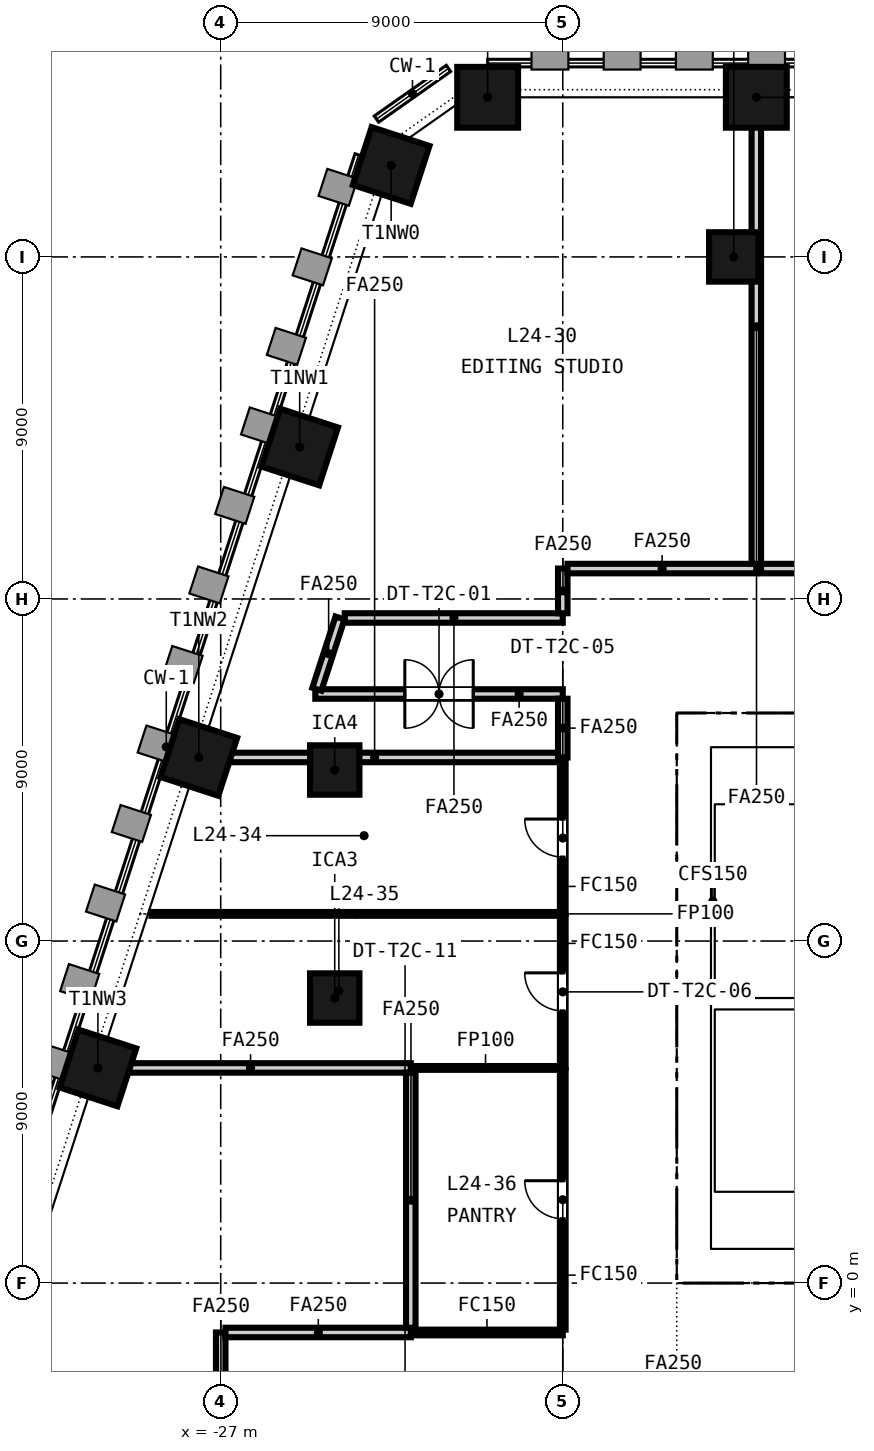
"""IFC4 building model, lengths in metres.
Left out: names, types, materials, properties, quantities, classifications, styles, units other than length and angle.
Written with IfcOpenShell. Run it as: python <this file> out.ifc"""

import sys

from ifc_helpers import new_model, si_unit, direction, frame, frame_2d, origin, origin_2d, place, context, subcontext, project, spatial, rectangle, extrude, element, fill, save


model = new_model("IFC4")
c1 = context("Model", 3, precision=1e-05, world=origin(), true_north=direction((0.0, 1.0)))
c2 = subcontext(c1, "Body", "Model", "MODEL_VIEW")
j1 = project(units=[si_unit("LENGTHUNIT", "METRE"), si_unit("PLANEANGLEUNIT", "RADIAN")], contexts=[c1])
p1 = place(None, origin())
s1 = spatial("IfcSite", under=j1, at=p1, CompositionType="ELEMENT")
p2 = place(p1, origin())
s2 = spatial("IfcBuilding", under=s1, at=p2, CompositionType="ELEMENT")
p3 = place(p2, frame((0.0, 0.0, 102.55)))
s3 = spatial("IfcBuildingStorey", under=s2, at=p3, CompositionType="ELEMENT", Elevation=102.55)
p4 = place(p3, frame((-15.0, 0.45, -0.15), z_axis=(0.0, 0.0, 1.0), x_axis=(1.0, 0.0, 0.0)))
e1 = element("IfcWall", 1, at=p4, inside=s3, PredefinedType="SOLIDWALL", context=c2, shape_type="SweptSolid", body=[
    extrude(rectangle(XDim=30.0, YDim=0.9, at=frame_2d((15.0, 0.0))), origin(), (0.0, 0.0, 1.0), 3.65),
])
p5 = place(p4, frame((5.8, 0.0, 0.15)))
e2 = element("IfcOpeningElement", 2, at=p5, cuts=e1, PredefinedType="OPENING", context=c2, shape_type="SweptSolid", body=[
    extrude(rectangle(XDim=2.4, YDim=2.4, at=frame_2d((1.2, 1.2))), frame((0.0, 0.46, 0.0), z_axis=(0.0, -1.0, 0.0), x_axis=(1.0, 0.0, 0.0)), (0.0, 0.0, 1.0), 0.92),
])
p6 = place(p4, frame((13.8, 0.0, 0.15)))
e3 = element("IfcOpeningElement", 3, at=p6, cuts=e1, PredefinedType="OPENING", context=c2, shape_type="SweptSolid", body=[
    extrude(rectangle(XDim=2.4, YDim=2.4, at=frame_2d((1.2, 1.2))), frame((0.0, 0.46, 0.0), z_axis=(0.0, -1.0, 0.0), x_axis=(1.0, 0.0, 0.0)), (0.0, 0.0, 1.0), 0.92),
])
p7 = place(p4, frame((21.8, 0.0, 0.15)))
e4 = element("IfcOpeningElement", 4, at=p7, cuts=e1, PredefinedType="OPENING", context=c2, shape_type="SweptSolid", body=[
    extrude(rectangle(XDim=2.4, YDim=2.4, at=frame_2d((1.2, 1.2))), frame((0.0, 0.46, 0.0), z_axis=(0.0, -1.0, 0.0), x_axis=(1.0, 0.0, 0.0)), (0.0, 0.0, 1.0), 0.92),
])
p8 = place(p4, frame((1.5, 0.0, 0.15)))
e5 = element("IfcOpeningElement", 5, at=p8, cuts=e1, PredefinedType="OPENING", context=c2, shape_type="SweptSolid", body=[
    extrude(rectangle(XDim=1.2, YDim=2.1, at=frame_2d((0.6, 1.05))), frame((0.0, 0.46, 0.0), z_axis=(0.0, -1.0, 0.0), x_axis=(1.0, 0.0, 0.0)), (0.0, 0.0, 1.0), 0.92),
])
p9 = place(p4, frame((27.3, 0.0, 0.15)))
e6 = element("IfcOpeningElement", 6, at=p9, cuts=e1, PredefinedType="OPENING", context=c2, shape_type="SweptSolid", body=[
    extrude(rectangle(XDim=1.2, YDim=2.1, at=frame_2d((0.6, 1.05))), frame((0.0, 0.46, 0.0), z_axis=(0.0, -1.0, 0.0), x_axis=(1.0, 0.0, 0.0)), (0.0, 0.0, 1.0), 0.92),
])
p10 = place(p3, frame((-15.0, 14.55, -0.15), z_axis=(0.0, 0.0, 1.0), x_axis=(1.0, 0.0, 0.0)))
e7 = element("IfcWall", 7, at=p10, inside=s3, PredefinedType="SOLIDWALL", context=c2, shape_type="SweptSolid", body=[
    extrude(rectangle(XDim=30.0, YDim=0.9, at=frame_2d((15.0, 0.0))), origin(), (0.0, 0.0, 1.0), 3.65),
])
p11 = place(p10, frame((9.25, 0.0, 0.15)))
e8 = element("IfcOpeningElement", 8, at=p11, cuts=e7, PredefinedType="OPENING", context=c2, shape_type="SweptSolid", body=[
    extrude(rectangle(XDim=1.5, YDim=2.1, at=frame_2d((0.75, 1.05))), frame((0.0, 0.46, 0.0), z_axis=(0.0, -1.0, 0.0), x_axis=(1.0, 0.0, 0.0)), (0.0, 0.0, 1.0), 0.92),
])
p12 = place(p10, frame((19.4, 0.0, 0.15)))
e9 = element("IfcOpeningElement", 9, at=p12, cuts=e7, PredefinedType="OPENING", context=c2, shape_type="SweptSolid", body=[
    extrude(rectangle(XDim=1.5, YDim=2.1, at=frame_2d((0.75, 1.05))), frame((0.0, 0.46, 0.0), z_axis=(0.0, -1.0, 0.0), x_axis=(1.0, 0.0, 0.0)), (0.0, 0.0, 1.0), 0.92),
])
p13 = place(p10, frame((1.5, 0.0, 0.15)))
e10 = element("IfcOpeningElement", 10, at=p13, cuts=e7, PredefinedType="OPENING", context=c2, shape_type="SweptSolid", body=[
    extrude(rectangle(XDim=1.2, YDim=2.1, at=frame_2d((0.6, 1.05))), frame((0.0, 0.46, 0.0), z_axis=(0.0, -1.0, 0.0), x_axis=(1.0, 0.0, 0.0)), (0.0, 0.0, 1.0), 0.92),
])
p14 = place(p10, frame((27.3, 0.0, 0.15)))
e11 = element("IfcOpeningElement", 11, at=p14, cuts=e7, PredefinedType="OPENING", context=c2, shape_type="SweptSolid", body=[
    extrude(rectangle(XDim=1.2, YDim=2.1, at=frame_2d((0.6, 1.05))), frame((0.0, 0.46, 0.0), z_axis=(0.0, -1.0, 0.0), x_axis=(1.0, 0.0, 0.0)), (0.0, 0.0, 1.0), 0.92),
])
p15 = place(p3, frame((-14.55, 0.9, -0.15), z_axis=(0.0, 0.0, 1.0), x_axis=(0.0, 1.0, 0.0)))
e12 = element("IfcWall", 12, at=p15, inside=s3, PredefinedType="SOLIDWALL", context=c2, shape_type="SweptSolid", body=[
    extrude(rectangle(XDim=13.2, YDim=0.9, at=frame_2d((6.6, 0.0))), origin(), (0.0, 0.0, 1.0), 3.65),
])
for number, where, z_axis, x_axis in (
    (13, (-12.907, 31.2, -0.15), (0.0, 0.0, 1.0), (-1.0, 0.0, 0.0)),
    (14, (-19.976, 31.2, -0.15), (0.0, 0.0, 1.0), (-1.0, 0.0, 0.0)),
    (15, (-22.515, 29.407, -0.15), (0.0, 0.0, 1.0), (-0.309, -0.951, 0.0)),
    (16, (-24.923, 21.999, -0.15), (0.0, 0.0, 1.0), (-0.309, -0.951, 0.0)),
    (17, (-27.577, 13.83, -0.15), (0.0, 0.0, 1.0), (-0.309, -0.951, 0.0)),
    (18, (-30.231, 5.661, -0.15), (0.0, 0.0, 1.0), (-0.309, -0.951, 0.0)),
):
    element("IfcColumn", number, at=place(p3, frame(where, z_axis=z_axis, x_axis=x_axis)), inside=s3, PredefinedType="COLUMN", context=c2, shape_type="SweptSolid", body=[
        extrude(rectangle(XDim=1.6, YDim=1.6, at=origin_2d()), origin(), (0.0, 0.0, 1.0), 3.65),
    ])
for number, where, z_axis, x_axis in (
    (19, (-24.0, 7.5, -0.15), (0.0, 0.0, 1.0), (1.0, 0.0, 0.0)),
    (20, (-24.0, 13.5, -0.15), (0.0, 0.0, 1.0), (1.0, 0.0, 0.0)),
    (21, (-13.5, 27.0, -0.15), (0.0, 0.0, 1.0), (1.0, 0.0, 0.0)),
):
    element("IfcColumn", number, at=place(p3, frame(where, z_axis=z_axis, x_axis=x_axis)), inside=s3, PredefinedType="COLUMN", context=c2, shape_type="SweptSolid", body=[
        extrude(rectangle(XDim=1.3, YDim=1.3, at=origin_2d()), origin(), (0.0, 0.0, 1.0), 3.65),
    ])
p16 = place(p3, frame((-14.0, 7.35, 0.0), z_axis=(0.0, 0.0, 1.0), x_axis=(1.0, 0.0, 0.0)))
e22 = element("IfcWall", 22, at=p16, inside=s3, PredefinedType="SOLIDWALL", context=c2, shape_type="SweptSolid", body=[
    extrude(rectangle(XDim=2.95, YDim=0.3, at=frame_2d((1.475, 0.0))), origin(), (0.0, 0.0, 1.0), 3.5),
])
p17 = place(p3, frame((-14.05, 0.9, 0.0), z_axis=(0.0, 0.0, 1.0), x_axis=(0.0, 1.0, 0.0)))
e23 = element("IfcWall", 23, at=p17, inside=s3, PredefinedType="SOLIDWALL", context=c2, shape_type="SweptSolid", body=[
    extrude(rectangle(XDim=13.2, YDim=0.1, at=frame_2d((6.6, 0.0))), origin(), (0.0, 0.0, 1.0), 3.5),
])
p18 = place(p3, frame((-18.0, 15.5, 0.0), z_axis=(0.0, 0.0, 1.0), x_axis=(-1.0, 0.0, 0.0)))
e24 = element("IfcWall", 24, at=p18, inside=s3, PredefinedType="PARTITIONING", context=c2, shape_type="SweptSolid", body=[
    extrude(rectangle(XDim=6.511, YDim=0.25, at=frame_2d((3.255, 0.0))), origin(), (0.0, 0.0, 1.0), 2.741),
])
p19 = place(p18, frame((2.355, 0.0, 0.0)))
e25 = element("IfcOpeningElement", 25, at=p19, cuts=e24, PredefinedType="OPENING", context=c2, shape_type="SweptSolid", body=[
    extrude(rectangle(XDim=1.8, YDim=2.1, at=frame_2d((0.9, 1.05))), frame((0.0, 0.135, 0.0), z_axis=(0.0, -1.0, 0.0), x_axis=(1.0, 0.0, 0.0)), (0.0, 0.0, 1.0), 0.27),
])
p20 = place(p3, frame((-24.47, 15.625, 0.0), z_axis=(0.0, 0.0, 1.0), x_axis=(0.309086072338, 0.951034068731, 0.0)))
e26 = element("IfcWall", 26, at=p20, inside=s3, PredefinedType="PARTITIONING", context=c2, shape_type="SweptSolid", body=[
    extrude(rectangle(XDim=1.971, YDim=0.25, at=frame_2d((0.986, 0.0))), origin(), (0.0, 0.0, 1.0), 2.741),
])
p21 = place(p3, frame((-23.736, 17.5, 0.0), z_axis=(0.0, 0.0, 1.0), x_axis=(1.0, 0.0, 0.0)))
e27 = element("IfcWall", 27, at=p21, inside=s3, PredefinedType="PARTITIONING", context=c2, shape_type="SweptSolid", body=[
    extrude(rectangle(XDim=5.736, YDim=0.25, at=frame_2d((2.868, 0.0))), origin(), (0.0, 0.0, 1.0), 2.741),
])
p22 = place(p3, frame((-18.0, 17.625, 0.0), z_axis=(0.0, 0.0, 1.0), x_axis=(0.0, 1.0, 0.0)))
e28 = element("IfcWall", 28, at=p22, inside=s3, PredefinedType="PARTITIONING", context=c2, shape_type="SweptSolid", body=[
    extrude(rectangle(XDim=1.175, YDim=0.25, at=frame_2d((0.587, 0.0))), origin(), (0.0, 0.0, 1.0), 2.741),
])
p23 = place(p3, frame((-17.875, 18.8, 0.0), z_axis=(0.0, 0.0, 1.0), x_axis=(1.0, 0.0, 0.0)))
e29 = element("IfcWall", 29, at=p23, inside=s3, PredefinedType="PARTITIONING", context=c2, shape_type="SweptSolid", body=[
    extrude(rectangle(XDim=4.968, YDim=0.25, at=frame_2d((2.484, 0.0))), origin(), (0.0, 0.0, 1.0), 2.741),
])
p24 = place(p3, frame((-18.0, 13.83, 0.0), z_axis=(0.0, 0.0, 1.0), x_axis=(0.0, 1.0, 0.0)))
e30 = element("IfcWall", 30, at=p24, inside=s3, PredefinedType="PARTITIONING", context=c2, shape_type="SweptSolid", body=[
    extrude(rectangle(XDim=1.545, YDim=0.25, at=frame_2d((0.772, 0.0))), origin(), (0.0, 0.0, 1.0), 2.741),
])
p25 = place(p3, frame((-12.907, 18.925, 0.0), z_axis=(0.0, 0.0, 1.0), x_axis=(0.0, 1.0, 0.0)))
e31 = element("IfcWall", 31, at=p25, inside=s3, PredefinedType="PARTITIONING", context=c2, shape_type="SweptSolid", body=[
    extrude(rectangle(XDim=12.475, YDim=0.25, at=frame_2d((6.237, 0.0))), origin(), (0.0, 0.0, 1.0), 2.741),
])
p26 = place(p3, frame((-27.787, 13.83, 0.0), z_axis=(0.0, 0.0, 1.0), x_axis=(1.0, 0.0, 0.0)))
e32 = element("IfcWall", 32, at=p26, inside=s3, PredefinedType="PARTITIONING", context=c2, shape_type="SweptSolid", body=[
    extrude(rectangle(XDim=9.662, YDim=0.25, at=frame_2d((4.831, 0.0))), origin(), (0.0, 0.0, 1.0), 2.741),
])
p27 = place(p3, frame((-12.782, 18.8, 0.0), z_axis=(0.0, 0.0, 1.0), x_axis=(1.0, 0.0, 0.0)))
e33 = element("IfcWall", 33, at=p27, inside=s3, PredefinedType="PARTITIONING", context=c2, shape_type="SweptSolid", body=[
    extrude(rectangle(XDim=5.882, YDim=0.25, at=frame_2d((2.941, 0.0))), origin(), (0.0, 0.0, 1.0), 2.741),
])
p28 = place(p3, frame((-18.0, 9.714, 0.0), z_axis=(0.0, 0.0, 1.0), x_axis=(0.0, 1.0, 0.0)))
e34 = element("IfcWall", 34, at=p28, inside=s3, PredefinedType="PARTITIONING", context=c2, shape_type="SweptSolid", body=[
    extrude(rectangle(XDim=3.991, YDim=0.15, at=frame_2d((1.996, 0.0))), origin(), (0.0, 0.0, 1.0), 2.741),
])
p29 = place(p28, frame((1.496, 0.0, 0.0)))
e35 = element("IfcOpeningElement", 35, at=p29, cuts=e34, PredefinedType="OPENING", context=c2, shape_type="SweptSolid", body=[
    extrude(rectangle(XDim=1.0, YDim=2.1, at=frame_2d((0.5, 1.05))), frame((0.0, 0.085, 0.0), z_axis=(0.0, -1.0, 0.0), x_axis=(1.0, 0.0, 0.0)), (0.0, 0.0, 1.0), 0.17),
])
p30 = place(p3, frame((-28.824, 9.714, 0.0), z_axis=(0.0, 0.0, 1.0), x_axis=(1.0, 0.0, 0.0)))
e36 = element("IfcWall", 36, at=p30, inside=s3, PredefinedType="PARTITIONING", context=c2, shape_type="SweptSolid", body=[
    extrude(rectangle(XDim=10.749, YDim=0.1, at=frame_2d((5.375, 0.0))), origin(), (0.0, 0.0, 1.0), 2.741),
])
p31 = place(p3, frame((-18.0, 5.661, 0.0), z_axis=(0.0, 0.0, 1.0), x_axis=(0.0, 1.0, 0.0)))
e37 = element("IfcWall", 37, at=p31, inside=s3, PredefinedType="PARTITIONING", context=c2, shape_type="SweptSolid", body=[
    extrude(rectangle(XDim=4.003, YDim=0.15, at=frame_2d((2.001, 0.0))), origin(), (0.0, 0.0, 1.0), 2.741),
])
p32 = place(p31, frame((1.501, 0.0, 0.0)))
e38 = element("IfcOpeningElement", 38, at=p32, cuts=e37, PredefinedType="OPENING", context=c2, shape_type="SweptSolid", body=[
    extrude(rectangle(XDim=1.0, YDim=2.1, at=frame_2d((0.5, 1.05))), frame((0.0, 0.085, 0.0), z_axis=(0.0, -1.0, 0.0), x_axis=(1.0, 0.0, 0.0)), (0.0, 0.0, 1.0), 0.17),
])
p33 = place(p3, frame((-21.999, 5.661, 0.0), z_axis=(0.0, 0.0, 1.0), x_axis=(1.0, 0.0, 0.0)))
e39 = element("IfcWall", 39, at=p33, inside=s3, PredefinedType="PARTITIONING", context=c2, shape_type="SweptSolid", body=[
    extrude(rectangle(XDim=3.924, YDim=0.1, at=frame_2d((1.962, 0.0))), origin(), (0.0, 0.0, 1.0), 2.741),
])
p34 = place(p3, frame((-30.441, 5.661, 0.0), z_axis=(0.0, 0.0, 1.0), x_axis=(1.0, 0.0, 0.0)))
e40 = element("IfcWall", 40, at=p34, inside=s3, PredefinedType="PARTITIONING", context=c2, shape_type="SweptSolid", body=[
    extrude(rectangle(XDim=8.442, YDim=0.25, at=frame_2d((4.221, 0.0))), origin(), (0.0, 0.0, 1.0), 2.741),
])
p35 = place(p3, frame((-21.999, -1.3, 0.0), z_axis=(0.0, 0.0, 1.0), x_axis=(1.0, 0.0, 0.0)))
e41 = element("IfcWall", 41, at=p35, inside=s3, PredefinedType="PARTITIONING", context=c2, shape_type="SweptSolid", body=[
    extrude(rectangle(XDim=3.999, YDim=0.15, at=frame_2d((2.0, 0.0))), origin(), (0.0, 0.0, 1.0), 2.741),
])
p36 = place(p3, frame((-18.0, -1.225, 0.0), z_axis=(0.0, 0.0, 1.0), x_axis=(0.0, 1.0, 0.0)))
e42 = element("IfcWall", 42, at=p36, inside=s3, PredefinedType="PARTITIONING", context=c2, shape_type="SweptSolid", body=[
    extrude(rectangle(XDim=6.836, YDim=0.15, at=frame_2d((3.418, 0.0))), origin(), (0.0, 0.0, 1.0), 2.741),
])
p37 = place(p36, frame((2.918, 0.0, 0.0)))
e43 = element("IfcOpeningElement", 43, at=p37, cuts=e42, PredefinedType="OPENING", context=c2, shape_type="SweptSolid", body=[
    extrude(rectangle(XDim=1.0, YDim=2.1, at=frame_2d((0.5, 1.05))), frame((0.0, 0.085, 0.0), z_axis=(0.0, -1.0, 0.0), x_axis=(1.0, 0.0, 0.0)), (0.0, 0.0, 1.0), 0.17),
])
p38 = place(p3, frame((-27.0, -3.575, 0.0), z_axis=(0.0, 0.0, 1.0), x_axis=(0.0, 1.0, 0.0)))
e44 = element("IfcWall", 44, at=p38, inside=s3, PredefinedType="PARTITIONING", context=c2, shape_type="SweptSolid", body=[
    extrude(rectangle(XDim=2.275, YDim=0.25, at=frame_2d((1.137, 0.0))), origin(), (0.0, 0.0, 1.0), 2.741),
])
p39 = place(p3, frame((-26.875, -1.3, 0.0), z_axis=(0.0, 0.0, 1.0), x_axis=(1.0, 0.0, 0.0)))
e45 = element("IfcWall", 45, at=p39, inside=s3, PredefinedType="PARTITIONING", context=c2, shape_type="SweptSolid", body=[
    extrude(rectangle(XDim=4.876, YDim=0.25, at=frame_2d((2.438, 0.0))), origin(), (0.0, 0.0, 1.0), 2.741),
])
p40 = place(p3, frame((-21.999, -1.175, 0.0), z_axis=(0.0, 0.0, 1.0), x_axis=(0.0, 1.0, 0.0)))
e46 = element("IfcWall", 46, at=p40, inside=s3, PredefinedType="PARTITIONING", context=c2, shape_type="SweptSolid", body=[
    extrude(rectangle(XDim=6.711, YDim=0.25, at=frame_2d((3.355, 0.0))), origin(), (0.0, 0.0, 1.0), 2.741),
])
p41 = place(p13, origin())
e47 = element("IfcDoor", 47, at=p41, inside=s3, OperationType="SINGLE_SWING_RIGHT", PredefinedType="DOOR", context=c2, shape_type="SweptSolid", body=[
    extrude(rectangle(XDim=1.2, YDim=2.1, at=frame_2d((0.6, 1.05))), frame((0.0, 0.025, 0.0), z_axis=(0.0, -1.0, 0.0), x_axis=(1.0, 0.0, 0.0)), (0.0, 0.0, 1.0), 0.05),
])
fill(e10, e47)
p42 = place(p8, origin())
e48 = element("IfcDoor", 48, at=p42, inside=s3, OperationType="SINGLE_SWING_LEFT", PredefinedType="DOOR", context=c2, shape_type="SweptSolid", body=[
    extrude(rectangle(XDim=1.2, YDim=2.1, at=frame_2d((0.6, 1.05))), frame((0.0, 0.025, 0.0), z_axis=(0.0, -1.0, 0.0), x_axis=(1.0, 0.0, 0.0)), (0.0, 0.0, 1.0), 0.05),
])
fill(e5, e48)
p43 = place(p19, origin())
e49 = element("IfcDoor", 49, at=p43, inside=s3, OperationType="DOUBLE_DOOR_DOUBLE_SWING", PredefinedType="DOOR", context=c2, shape_type="SweptSolid", body=[
    extrude(rectangle(XDim=1.8, YDim=2.1, at=frame_2d((0.9, 1.05))), frame((0.0, 0.025, 0.0), z_axis=(0.0, -1.0, 0.0), x_axis=(1.0, 0.0, 0.0)), (0.0, 0.0, 1.0), 0.05),
])
fill(e25, e49)
p44 = place(p29, origin())
e50 = element("IfcDoor", 50, at=p44, inside=s3, OperationType="SINGLE_SWING_RIGHT", PredefinedType="DOOR", context=c2, shape_type="SweptSolid", body=[
    extrude(rectangle(XDim=1.0, YDim=2.1, at=frame_2d((0.5, 1.05))), frame((0.0, 0.025, 0.0), z_axis=(0.0, -1.0, 0.0), x_axis=(1.0, 0.0, 0.0)), (0.0, 0.0, 1.0), 0.05),
])
fill(e35, e50)
p45 = place(p32, origin())
e51 = element("IfcDoor", 51, at=p45, inside=s3, OperationType="SINGLE_SWING_RIGHT", PredefinedType="DOOR", context=c2, shape_type="SweptSolid", body=[
    extrude(rectangle(XDim=1.0, YDim=2.1, at=frame_2d((0.5, 1.05))), frame((0.0, 0.025, 0.0), z_axis=(0.0, -1.0, 0.0), x_axis=(1.0, 0.0, 0.0)), (0.0, 0.0, 1.0), 0.05),
])
fill(e38, e51)
p46 = place(p37, origin())
e52 = element("IfcDoor", 52, at=p46, inside=s3, OperationType="SINGLE_SWING_RIGHT", PredefinedType="DOOR", context=c2, shape_type="SweptSolid", body=[
    extrude(rectangle(XDim=1.0, YDim=2.1, at=frame_2d((0.5, 1.05))), frame((0.0, 0.025, 0.0), z_axis=(0.0, -1.0, 0.0), x_axis=(1.0, 0.0, 0.0)), (0.0, 0.0, 1.0), 0.05),
])
fill(e43, e52)
save(model, sys.argv[1])
